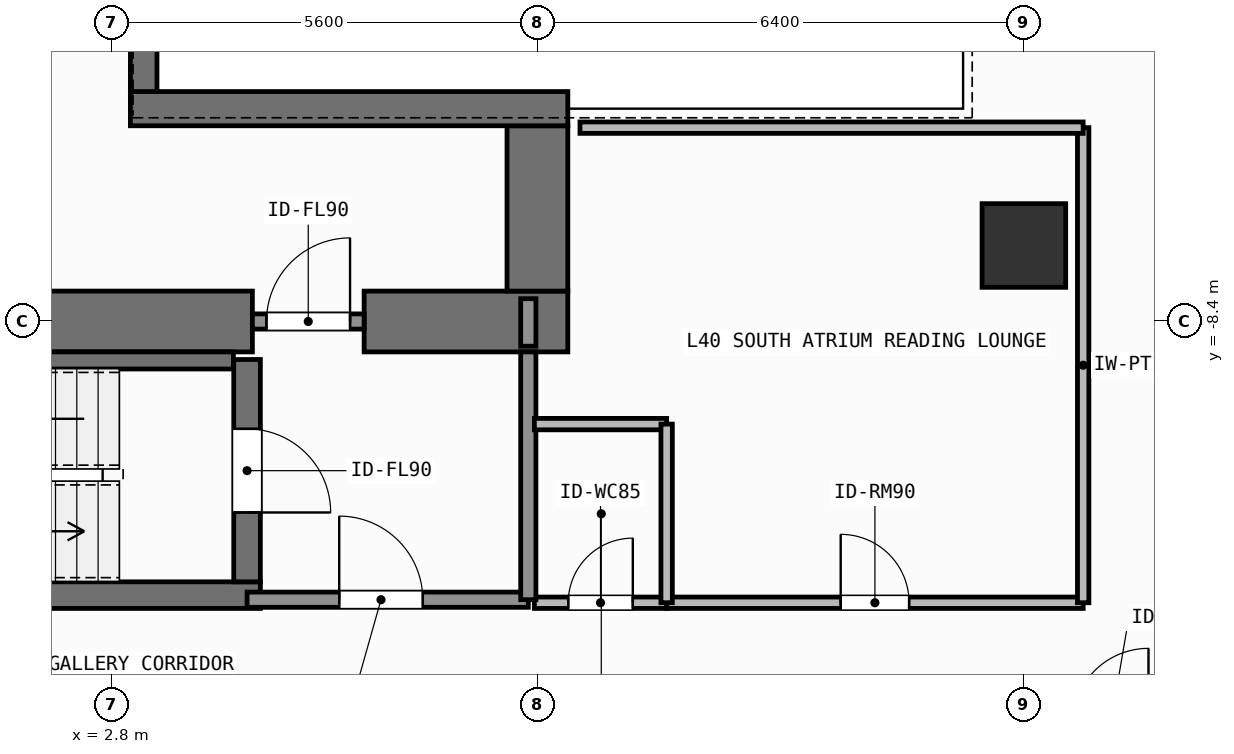
"""IFC4 building model, lengths in metres.
Left out: names, types, materials, properties, quantities, classifications, styles, units other than length and angle.
Written with IfcOpenShell. Run it as: python <this file> out.ifc"""

import sys

from ifc_helpers import new_model, si_unit, direction, frame, frame_2d, origin, origin_2d, place, context, subcontext, project, spatial, rectangle, extrude, element, fill, save


model = new_model("IFC4")
c1 = context("Model", 3, precision=1e-05, world=origin(), true_north=direction((0.0, 1.0)))
c2 = subcontext(c1, "Body", "Model", "MODEL_VIEW")
j1 = project(units=[si_unit("LENGTHUNIT", "METRE"), si_unit("PLANEANGLEUNIT", "RADIAN")], contexts=[c1])
p1 = place(None, origin())
s1 = spatial("IfcSite", under=j1, at=p1, CompositionType="ELEMENT")
p2 = place(p1, origin())
s2 = spatial("IfcBuilding", under=s1, at=p2, CompositionType="ELEMENT")
p3 = place(p2, frame((0.0, 0.0, 164.1)))
s3 = spatial("IfcBuildingStorey", under=s2, at=p3, CompositionType="ELEMENT", Elevation=164.1)
p4 = place(p3, frame((-2.62, -8.4, 0.0), z_axis=(0.0, 0.0, 1.0), x_axis=(1.0, 0.0, 0.0)))
e1 = element("IfcWall", 1, at=p4, inside=s3, PredefinedType="SHEAR", context=c2, shape_type="SweptSolid", body=[
    extrude(rectangle(XDim=7.27, YDim=0.8, at=frame_2d((3.635, 0.0))), origin(), (0.0, 0.0, 1.0), 3.9),
])
p5 = place(p3, frame((6.12, -8.4, 0.0), z_axis=(0.0, 0.0, 1.0), x_axis=(1.0, 0.0, 0.0)))
e2 = element("IfcWall", 2, at=p5, inside=s3, PredefinedType="SHEAR", context=c2, shape_type="SweptSolid", body=[
    extrude(rectangle(XDim=2.68, YDim=0.8, at=frame_2d((1.34, 0.0))), origin(), (0.0, 0.0, 1.0), 3.9),
])
p6 = place(p3, frame((8.4, -8.0, 0.0), z_axis=(0.0, 0.0, 1.0), x_axis=(0.0, 1.0, 0.0)))
e3 = element("IfcWall", 3, at=p6, inside=s3, PredefinedType="SHEAR", context=c2, shape_type="SweptSolid", body=[
    extrude(rectangle(XDim=2.175, YDim=0.8, at=frame_2d((1.087, 0.0))), origin(), (0.0, 0.0, 1.0), 3.9),
])
p7 = place(p3, frame((3.045, -5.6, 0.0), z_axis=(0.0, 0.0, 1.0), x_axis=(1.0, 0.0, 0.0)))
e4 = element("IfcWall", 4, at=p7, inside=s3, PredefinedType="SHEAR", context=c2, shape_type="SweptSolid", body=[
    extrude(rectangle(XDim=5.755, YDim=0.45, at=frame_2d((2.877, 0.0))), origin(), (0.0, 0.0, 1.0), 3.9),
])
p8 = place(p3, frame((3.22, -5.375, 0.0), z_axis=(0.0, 0.0, 1.0), x_axis=(0.0, 1.0, 0.0)))
e5 = element("IfcWall", 5, at=p8, inside=s3, PredefinedType="SHEAR", context=c2, shape_type="SweptSolid", body=[
    extrude(rectangle(XDim=10.75, YDim=0.35, at=frame_2d((5.375, 0.0))), origin(), (0.0, 0.0, 1.0), 3.9),
])
p9 = place(p3, frame((-2.555, -12.0, 0.0), z_axis=(0.0, 0.0, 1.0), x_axis=(1.0, 0.0, 0.0)))
e6 = element("IfcWall", 6, at=p9, inside=s3, PredefinedType="SHEAR", context=c2, shape_type="SweptSolid", body=[
    extrude(rectangle(XDim=7.31, YDim=0.35, at=frame_2d((3.655, 0.0))), origin(), (0.0, 0.0, 1.0), 3.9),
])
p10 = place(p3, frame((-2.2, -8.913, 0.0), z_axis=(0.0, 0.0, 1.0), x_axis=(1.0, 0.0, 0.0)))
e7 = element("IfcWall", 7, at=p10, inside=s3, PredefinedType="SHEAR", context=c2, shape_type="SweptSolid", body=[
    extrude(rectangle(XDim=6.6, YDim=0.225, at=frame_2d((3.3, 0.0))), origin(), (0.0, 0.0, 1.0), 3.9),
])
p11 = place(p3, frame((4.58, -8.9, 0.0), z_axis=(0.0, 0.0, 1.0), x_axis=(0.0, -1.0, 0.0)))
e8 = element("IfcWall", 8, at=p11, inside=s3, PredefinedType="SHEAR", context=c2, shape_type="SweptSolid", body=[
    extrude(rectangle(XDim=2.925, YDim=0.35, at=frame_2d((1.462, 0.0))), origin(), (0.0, 0.0, 1.0), 3.9),
])
p12 = place(p11, frame((0.913, 0.0, 0.0)))
e9 = element("IfcOpeningElement", 9, at=p12, cuts=e8, PredefinedType="OPENING", context=c2, shape_type="SweptSolid", body=[
    extrude(rectangle(XDim=1.1, YDim=2.15, at=frame_2d((0.55, 1.075))), frame((0.0, 0.185, 0.0), z_axis=(0.0, -1.0, 0.0), x_axis=(1.0, 0.0, 0.0)), (0.0, 0.0, 1.0), 0.37),
])
p13 = place(p3, frame((14.8, -7.4, 0.0), z_axis=(0.0, 0.0, 1.0), x_axis=(1.0, 0.0, 0.0)))
e10 = element("IfcColumn", 10, at=p13, inside=s3, PredefinedType="COLUMN", context=c2, shape_type="SweptSolid", body=[
    extrude(rectangle(XDim=1.1, YDim=1.1, at=origin_2d()), origin(), (0.0, 0.0, 1.0), 3.9),
])
p14 = place(p3, frame((4.58, -12.06, 0.0), z_axis=(0.0, 0.0, 1.0), x_axis=(1.0, 0.0, 0.0)))
e11 = element("IfcWall", 11, at=p14, inside=s3, PredefinedType="SOLIDWALL", context=c2, shape_type="SweptSolid", body=[
    extrude(rectangle(XDim=3.7, YDim=0.2, at=frame_2d((1.85, 0.0))), origin(), (0.0, 0.0, 1.0), 3.62),
])
p15 = place(p14, frame((1.212, 0.0, 0.0)))
e12 = element("IfcOpeningElement", 12, at=p15, cuts=e11, PredefinedType="OPENING", context=c2, shape_type="SweptSolid", body=[
    extrude(rectangle(XDim=1.1, YDim=2.15, at=frame_2d((0.55, 1.075))), frame((0.0, 0.11, 0.0), z_axis=(0.0, -1.0, 0.0), x_axis=(1.0, 0.0, 0.0)), (0.0, 0.0, 1.0), 0.22),
])
p16 = place(p3, frame((4.65, -8.4, 0.0), z_axis=(0.0, 0.0, 1.0), x_axis=(1.0, 0.0, 0.0)))
e13 = element("IfcWall", 13, at=p16, inside=s3, PredefinedType="SOLIDWALL", context=c2, shape_type="SweptSolid", body=[
    extrude(rectangle(XDim=1.47, YDim=0.2, at=frame_2d((0.735, 0.0))), origin(), (0.0, 0.0, 1.0), 2.76),
])
p17 = place(p16, frame((0.185, 0.0, 0.0)))
e14 = element("IfcOpeningElement", 14, at=p17, cuts=e13, PredefinedType="OPENING", context=c2, shape_type="SweptSolid", body=[
    extrude(rectangle(XDim=1.1, YDim=2.15, at=frame_2d((0.55, 1.075))), frame((0.0, 0.11, 0.0), z_axis=(0.0, -1.0, 0.0), x_axis=(1.0, 0.0, 0.0)), (0.0, 0.0, 1.0), 0.22),
])
p18 = place(p3, frame((8.36, -12.1, 0.0), z_axis=(0.0, 0.0, 1.0), x_axis=(1.0, 0.0, 0.0)))
e15 = element("IfcWall", 15, at=p18, inside=s3, PredefinedType="PARTITIONING", context=c2, shape_type="SweptSolid", body=[
    extrude(rectangle(XDim=1.74, YDim=0.15, at=frame_2d((0.87, 0.0))), origin(), (0.0, 0.0, 1.0), 3.62),
])
p19 = place(p18, frame((0.445, 0.0, 0.0)))
e16 = element("IfcOpeningElement", 16, at=p19, cuts=e15, PredefinedType="OPENING", context=c2, shape_type="SweptSolid", body=[
    extrude(rectangle(XDim=0.85, YDim=2.1, at=frame_2d((0.425, 1.05))), frame((0.0, 0.085, 0.0), z_axis=(0.0, -1.0, 0.0), x_axis=(1.0, 0.0, 0.0)), (0.0, 0.0, 1.0), 0.17),
])
p20 = place(p3, frame((10.1, -12.1, 0.0), z_axis=(0.0, 0.0, 1.0), x_axis=(1.0, 0.0, 0.0)))
e17 = element("IfcWall", 17, at=p20, inside=s3, PredefinedType="PARTITIONING", context=c2, shape_type="SweptSolid", body=[
    extrude(rectangle(XDim=5.48, YDim=0.15, at=frame_2d((2.74, 0.0))), origin(), (0.0, 0.0, 1.0), 3.62),
])
p21 = place(p20, frame((2.29, 0.0, 0.0)))
e18 = element("IfcOpeningElement", 18, at=p21, cuts=e17, PredefinedType="OPENING", context=c2, shape_type="SweptSolid", body=[
    extrude(rectangle(XDim=0.9, YDim=2.1, at=frame_2d((0.45, 1.05))), frame((0.0, 0.085, 0.0), z_axis=(0.0, -1.0, 0.0), x_axis=(1.0, 0.0, 0.0)), (0.0, 0.0, 1.0), 0.17),
])
p22 = place(p3, frame((8.28, -12.06, 0.0), z_axis=(0.0, 0.0, 1.0), x_axis=(0.0, 1.0, 0.0)))
e19 = element("IfcWall", 19, at=p22, inside=s3, PredefinedType="SOLIDWALL", context=c2, shape_type="SweptSolid", body=[
    extrude(rectangle(XDim=3.26, YDim=0.2, at=frame_2d((1.63, 0.0))), origin(), (0.0, 0.0, 1.0), 3.62),
])
p23 = place(p3, frame((8.28, -8.725, 0.0), z_axis=(0.0, 0.0, 1.0), x_axis=(0.0, 1.0, 0.0)))
e20 = element("IfcWall", 20, at=p23, inside=s3, PredefinedType="SOLIDWALL", context=c2, shape_type="SweptSolid", body=[
    extrude(rectangle(XDim=0.625, YDim=0.2, at=frame_2d((0.312, 0.0))), origin(), (0.0, 0.0, 1.0), 3.62),
])
p24 = place(p3, frame((8.36, -9.75, 0.0), z_axis=(0.0, 0.0, 1.0), x_axis=(1.0, 0.0, 0.0)))
e21 = element("IfcWall", 21, at=p24, inside=s3, PredefinedType="PARTITIONING", context=c2, shape_type="SweptSolid", body=[
    extrude(rectangle(XDim=1.74, YDim=0.15, at=frame_2d((0.87, 0.0))), origin(), (0.0, 0.0, 1.0), 3.62),
])
p25 = place(p3, frame((10.1, -12.1, 0.0), z_axis=(0.0, 0.0, 1.0), x_axis=(0.0, 1.0, 0.0)))
e22 = element("IfcWall", 22, at=p25, inside=s3, PredefinedType="PARTITIONING", context=c2, shape_type="SweptSolid", body=[
    extrude(rectangle(XDim=2.35, YDim=0.15, at=frame_2d((1.175, 0.0))), origin(), (0.0, 0.0, 1.0), 3.62),
])
p26 = place(p3, frame((15.58, -12.1, 0.0), z_axis=(0.0, 0.0, 1.0), x_axis=(0.0, 1.0, 0.0)))
e23 = element("IfcWall", 23, at=p26, inside=s3, PredefinedType="PARTITIONING", context=c2, shape_type="SweptSolid", body=[
    extrude(rectangle(XDim=6.25, YDim=0.15, at=frame_2d((3.125, 0.0))), origin(), (0.0, 0.0, 1.0), 3.62),
])
p27 = place(p3, frame((8.96, -5.85, 0.0), z_axis=(0.0, 0.0, 1.0), x_axis=(1.0, 0.0, 0.0)))
e24 = element("IfcWall", 24, at=p27, inside=s3, PredefinedType="PARTITIONING", context=c2, shape_type="SweptSolid", body=[
    extrude(rectangle(XDim=6.62, YDim=0.15, at=frame_2d((3.31, 0.0))), origin(), (0.0, 0.0, 1.0), 3.62),
])
p28 = place(p12, origin())
e25 = element("IfcDoor", 25, at=p28, inside=s3, OperationType="SINGLE_SWING_RIGHT", PredefinedType="DOOR", context=c2, shape_type="SweptSolid", body=[
    extrude(rectangle(XDim=1.1, YDim=2.15, at=frame_2d((0.55, 1.075))), frame((0.0, 0.025, 0.0), z_axis=(0.0, -1.0, 0.0), x_axis=(1.0, 0.0, 0.0)), (0.0, 0.0, 1.0), 0.05),
])
fill(e9, e25)
p29 = place(p15, origin())
e26 = element("IfcDoor", 26, at=p29, inside=s3, OperationType="SINGLE_SWING_LEFT", PredefinedType="DOOR", context=c2, shape_type="SweptSolid", body=[
    extrude(rectangle(XDim=1.1, YDim=2.15, at=frame_2d((0.55, 1.075))), frame((0.0, 0.025, 0.0), z_axis=(0.0, -1.0, 0.0), x_axis=(1.0, 0.0, 0.0)), (0.0, 0.0, 1.0), 0.05),
])
fill(e12, e26)
p30 = place(p17, origin())
e27 = element("IfcDoor", 27, at=p30, inside=s3, OperationType="SINGLE_SWING_RIGHT", PredefinedType="DOOR", context=c2, shape_type="SweptSolid", body=[
    extrude(rectangle(XDim=1.1, YDim=2.15, at=frame_2d((0.55, 1.075))), frame((0.0, 0.025, 0.0), z_axis=(0.0, -1.0, 0.0), x_axis=(1.0, 0.0, 0.0)), (0.0, 0.0, 1.0), 0.05),
])
fill(e14, e27)
p31 = place(p19, origin())
e28 = element("IfcDoor", 28, at=p31, inside=s3, OperationType="SINGLE_SWING_RIGHT", PredefinedType="DOOR", context=c2, shape_type="SweptSolid", body=[
    extrude(rectangle(XDim=0.85, YDim=2.1, at=frame_2d((0.425, 1.05))), frame((0.0, 0.025, 0.0), z_axis=(0.0, -1.0, 0.0), x_axis=(1.0, 0.0, 0.0)), (0.0, 0.0, 1.0), 0.05),
])
fill(e16, e28)
p32 = place(p21, origin())
e29 = element("IfcDoor", 29, at=p32, inside=s3, OperationType="SINGLE_SWING_LEFT", PredefinedType="DOOR", context=c2, shape_type="SweptSolid", body=[
    extrude(rectangle(XDim=0.9, YDim=2.1, at=frame_2d((0.45, 1.05))), frame((0.0, 0.025, 0.0), z_axis=(0.0, -1.0, 0.0), x_axis=(1.0, 0.0, 0.0)), (0.0, 0.0, 1.0), 0.05),
])
fill(e18, e29)
save(model, sys.argv[1])
